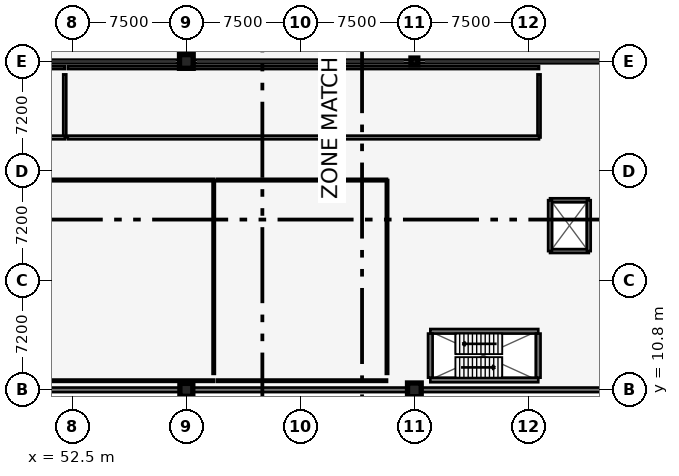
"""IFC4 building model, lengths in metres.
Left out: names, types, materials, properties, quantities, classifications, styles, units other than length and angle.
Written with IfcOpenShell. Run it as: python <this file> out.ifc"""

import sys

from ifc_helpers import new_model, si_unit, direction, frame, frame_2d, origin, origin_2d, place, context, subcontext, project, spatial, rectangle, circle, extrude, element, fill, save


model = new_model("IFC4")
c1 = context("Model", 3, precision=1e-05, world=origin(), true_north=direction((0.0, 1.0)))
c2 = subcontext(c1, "Body", "Model", "MODEL_VIEW")
j1 = project(units=[si_unit("LENGTHUNIT", "METRE"), si_unit("PLANEANGLEUNIT", "RADIAN")], contexts=[c1])
p1 = place(None, origin())
s1 = spatial("IfcSite", under=j1, at=p1, CompositionType="ELEMENT")
p2 = place(p1, origin())
s2 = spatial("IfcBuilding", under=s1, at=p2, CompositionType="ELEMENT")
p3 = place(p2, frame((0.0, 0.0, 4.8)))
s3 = spatial("IfcBuildingStorey", under=s2, at=p3, CompositionType="ELEMENT", Elevation=4.8)
p4 = place(p3, frame((60.0, 10.8, 0.0), z_axis=(0.0, 0.0, 1.0), x_axis=(1.0, 0.0, 0.0)))
e1 = element("IfcColumn", 1, at=p4, inside=s3, PredefinedType="COLUMN", context=c2, shape_type="SweptSolid", body=[
    extrude(rectangle(XDim=0.85, YDim=0.85, at=origin_2d()), origin(), (0.0, 0.0, 1.0), 4.2),
])
p5 = place(p3, frame((60.0, 32.4, 0.0), z_axis=(0.0, 0.0, 1.0), x_axis=(1.0, 0.0, 0.0)))
e2 = element("IfcColumn", 2, at=p5, inside=s3, PredefinedType="COLUMN", context=c2, shape_type="SweptSolid", body=[
    extrude(rectangle(XDim=0.9, YDim=0.9, at=origin_2d()), origin(), (0.0, 0.0, 1.0), 4.2),
])
p6 = place(p3, frame((75.0, 10.8, 0.0), z_axis=(0.0, 0.0, 1.0), x_axis=(1.0, 0.0, 0.0)))
e3 = element("IfcColumn", 3, at=p6, inside=s3, PredefinedType="COLUMN", context=c2, shape_type="SweptSolid", body=[
    extrude(circle(Radius=0.45, at=origin_2d()), origin(), (0.0, 0.0, 1.0), 4.2),
])
p7 = place(p3, frame((75.0, 32.4, 0.0), z_axis=(0.0, 0.0, 1.0), x_axis=(1.0, 0.0, 0.0)))
e4 = element("IfcColumn", 4, at=p7, inside=s3, PredefinedType="COLUMN", context=c2, shape_type="SweptSolid", body=[
    extrude(rectangle(XDim=0.45, YDim=0.45, at=origin_2d()), origin(), (0.0, 0.0, 1.0), 4.2),
])
p8 = place(p3, frame((0.0, 10.8, 0.0), z_axis=(0.0, 0.0, 1.0), x_axis=(1.0, 0.0, 0.0)))
e5 = element("IfcWall", 5, at=p8, inside=s3, PredefinedType="SOLIDWALL", context=c2, shape_type="SweptSolid", body=[
    extrude(rectangle(XDim=93.6, YDim=0.3, at=frame_2d((46.8, 0.0))), origin(), (0.0, 0.0, 1.0), 3.5),
])
p9 = place(p8, frame((2.2, 0.0, 0.72)))
e6 = element("IfcOpeningElement", 6, at=p9, cuts=e5, PredefinedType="OPENING", context=c2, shape_type="SweptSolid", body=[
    extrude(rectangle(XDim=1.2, YDim=2.0, at=frame_2d((0.6, 1.0))), frame((0.0, 0.16, 0.0), z_axis=(0.0, -1.0, 0.0), x_axis=(1.0, 0.0, 0.0)), (0.0, 0.0, 1.0), 0.32),
])
p10 = place(p8, frame((9.4, 0.0, 0.72)))
e7 = element("IfcOpeningElement", 7, at=p10, cuts=e5, PredefinedType="OPENING", context=c2, shape_type="SweptSolid", body=[
    extrude(rectangle(XDim=1.35, YDim=2.05, at=frame_2d((0.675, 1.025))), frame((0.0, 0.16, 0.0), z_axis=(0.0, -1.0, 0.0), x_axis=(1.0, 0.0, 0.0)), (0.0, 0.0, 1.0), 0.32),
])
p11 = place(p8, frame((16.6, 0.0, 0.72)))
e8 = element("IfcOpeningElement", 8, at=p11, cuts=e5, PredefinedType="OPENING", context=c2, shape_type="SweptSolid", body=[
    extrude(rectangle(XDim=1.5, YDim=2.1, at=frame_2d((0.75, 1.05))), frame((0.0, 0.16, 0.0), z_axis=(0.0, -1.0, 0.0), x_axis=(1.0, 0.0, 0.0)), (0.0, 0.0, 1.0), 0.32),
])
p12 = place(p8, frame((23.8, 0.0, 0.72)))
e9 = element("IfcOpeningElement", 9, at=p12, cuts=e5, PredefinedType="OPENING", context=c2, shape_type="SweptSolid", body=[
    extrude(rectangle(XDim=1.65, YDim=2.1, at=frame_2d((0.825, 1.05))), frame((0.0, 0.16, 0.0), z_axis=(0.0, -1.0, 0.0), x_axis=(1.0, 0.0, 0.0)), (0.0, 0.0, 1.0), 0.32),
])
p13 = place(p8, frame((31.0, 0.0, 0.72)))
e10 = element("IfcOpeningElement", 10, at=p13, cuts=e5, PredefinedType="OPENING", context=c2, shape_type="SweptSolid", body=[
    extrude(rectangle(XDim=1.8, YDim=2.15, at=frame_2d((0.9, 1.075))), frame((0.0, 0.16, 0.0), z_axis=(0.0, -1.0, 0.0), x_axis=(1.0, 0.0, 0.0)), (0.0, 0.0, 1.0), 0.32),
])
p14 = place(p8, frame((38.2, 0.0, 0.72)))
e11 = element("IfcOpeningElement", 11, at=p14, cuts=e5, PredefinedType="OPENING", context=c2, shape_type="SweptSolid", body=[
    extrude(rectangle(XDim=1.2, YDim=2.0, at=frame_2d((0.6, 1.0))), frame((0.0, 0.16, 0.0), z_axis=(0.0, -1.0, 0.0), x_axis=(1.0, 0.0, 0.0)), (0.0, 0.0, 1.0), 0.32),
])
p15 = place(p8, frame((52.6, 0.0, 0.72)))
e12 = element("IfcOpeningElement", 12, at=p15, cuts=e5, PredefinedType="OPENING", context=c2, shape_type="SweptSolid", body=[
    extrude(rectangle(XDim=1.5, YDim=2.1, at=frame_2d((0.75, 1.05))), frame((0.0, 0.16, 0.0), z_axis=(0.0, -1.0, 0.0), x_axis=(1.0, 0.0, 0.0)), (0.0, 0.0, 1.0), 0.32),
])
p16 = place(p8, frame((67.0, 0.0, 0.72)))
e13 = element("IfcOpeningElement", 13, at=p16, cuts=e5, PredefinedType="OPENING", context=c2, shape_type="SweptSolid", body=[
    extrude(rectangle(XDim=1.8, YDim=2.15, at=frame_2d((0.9, 1.075))), frame((0.0, 0.16, 0.0), z_axis=(0.0, -1.0, 0.0), x_axis=(1.0, 0.0, 0.0)), (0.0, 0.0, 1.0), 0.32),
])
p17 = place(p8, frame((81.4, 0.0, 0.72)))
e14 = element("IfcOpeningElement", 14, at=p17, cuts=e5, PredefinedType="OPENING", context=c2, shape_type="SweptSolid", body=[
    extrude(rectangle(XDim=1.35, YDim=2.05, at=frame_2d((0.675, 1.025))), frame((0.0, 0.16, 0.0), z_axis=(0.0, -1.0, 0.0), x_axis=(1.0, 0.0, 0.0)), (0.0, 0.0, 1.0), 0.32),
])
p18 = place(p3, frame((45.0, 32.4, 0.0), z_axis=(0.0, 0.0, 1.0), x_axis=(1.0, 0.0, 0.0)))
e15 = element("IfcWall", 15, at=p18, inside=s3, PredefinedType="PARAPET", context=c2, shape_type="SweptSolid", body=[
    extrude(rectangle(XDim=48.6, YDim=0.24, at=frame_2d((24.3, 0.0))), origin(), (0.0, 0.0, 1.0), 1.15),
])
for number, where, z_axis, x_axis in (
    (16, (76.05, 11.45, 0.0), (0.0, 0.0, 1.0), (1.0, 0.0, 0.0)),
    (17, (83.15, 14.65, 0.0), (0.0, 0.0, 1.0), (-1.0, 0.0, 0.0)),
):
    element("IfcWall", number, at=place(p3, frame(where, z_axis=z_axis, x_axis=x_axis)), inside=s3, PredefinedType="SHEAR", context=c2, shape_type="SweptSolid", body=[
        extrude(rectangle(XDim=7.1, YDim=0.3, at=frame_2d((3.55, 0.0))), origin(), (0.0, 0.0, 1.0), 3.9),
    ])
p19 = place(p3, frame((83.15, 11.6, 0.0), z_axis=(0.0, 0.0, 1.0), x_axis=(0.0, 1.0, 0.0)))
e18 = element("IfcWall", 18, at=p19, inside=s3, PredefinedType="SHEAR", context=c2, shape_type="SweptSolid", body=[
    extrude(rectangle(XDim=2.9, YDim=0.3, at=frame_2d((1.45, 0.0))), origin(), (0.0, 0.0, 1.0), 3.9),
])
p20 = place(p3, frame((76.05, 14.5, 0.0), z_axis=(0.0, 0.0, 1.0), x_axis=(0.0, -1.0, 0.0)))
e19 = element("IfcWall", 19, at=p20, inside=s3, PredefinedType="SHEAR", context=c2, shape_type="SweptSolid", body=[
    extrude(rectangle(XDim=2.9, YDim=0.3, at=frame_2d((1.45, 0.0))), origin(), (0.0, 0.0, 1.0), 3.9),
])
p21 = place(p20, frame((0.75, 0.0, 0.0)))
e20 = element("IfcOpeningElement", 20, at=p21, cuts=e19, PredefinedType="OPENING", context=c2, shape_type="SweptSolid", body=[
    extrude(rectangle(XDim=1.07, YDim=2.15, at=frame_2d((0.535, 1.075))), frame((0.0, 0.16, 0.0), z_axis=(0.0, -1.0, 0.0), x_axis=(1.0, 0.0, 0.0)), (0.0, 0.0, 1.0), 0.32),
])
p22 = place(p3, frame((83.925, 19.925, 0.0), z_axis=(0.0, 0.0, 1.0), x_axis=(1.0, 0.0, 0.0)))
e21 = element("IfcWall", 21, at=p22, inside=s3, PredefinedType="SHEAR", context=c2, shape_type="SweptSolid", body=[
    extrude(rectangle(XDim=2.55, YDim=0.25, at=frame_2d((1.275, 0.0))), origin(), (0.0, 0.0, 1.0), 3.9),
])
p23 = place(p3, frame((86.475, 23.275, 0.0), z_axis=(0.0, 0.0, 1.0), x_axis=(-1.0, 0.0, 0.0)))
e22 = element("IfcWall", 22, at=p23, inside=s3, PredefinedType="SHEAR", context=c2, shape_type="SweptSolid", body=[
    extrude(rectangle(XDim=2.55, YDim=0.25, at=frame_2d((1.275, 0.0))), origin(), (0.0, 0.0, 1.0), 3.9),
])
p24 = place(p23, frame((0.525, 0.0, 0.0)))
e23 = element("IfcOpeningElement", 23, at=p24, cuts=e22, PredefinedType="OPENING", context=c2, shape_type="SweptSolid", body=[
    extrude(rectangle(XDim=1.5, YDim=2.2, at=frame_2d((0.75, 1.1))), frame((0.0, 0.135, 0.0), z_axis=(0.0, -1.0, 0.0), x_axis=(1.0, 0.0, 0.0)), (0.0, 0.0, 1.0), 0.27),
])
for number, where, z_axis, x_axis in (
    (24, (83.925, 23.275, 0.0), (0.0, 0.0, 1.0), (0.0, -1.0, 0.0)),
    (25, (86.475, 19.925, 0.0), (0.0, 0.0, 1.0), (0.0, 1.0, 0.0)),
):
    element("IfcWall", number, at=place(p3, frame(where, z_axis=z_axis, x_axis=x_axis)), inside=s3, PredefinedType="SHEAR", context=c2, shape_type="SweptSolid", body=[
        extrude(rectangle(XDim=3.35, YDim=0.25, at=frame_2d((1.675, 0.0))), origin(), (0.0, 0.0, 1.0), 3.9),
    ])
p25 = place(p3, frame((61.8, 11.4, 0.0), z_axis=(0.0, 0.0, 1.0), x_axis=(-1.0, 0.0, 0.0)))
e26 = element("IfcWall", 26, at=p25, inside=s3, PredefinedType="PARTITIONING", context=c2, shape_type="SweptSolid", body=[
    extrude(rectangle(XDim=13.05, YDim=0.15, at=frame_2d((6.525, 0.0))), origin(), (0.0, 0.0, 1.0), 3.082),
])
p26 = place(p3, frame((61.8, 11.85, 0.0), z_axis=(0.0, 0.0, 1.0), x_axis=(0.0, 1.0, 0.0)))
e27 = element("IfcWall", 27, at=p26, inside=s3, PredefinedType="PARTITIONING", context=c2, shape_type="SweptSolid", body=[
    extrude(rectangle(XDim=12.75, YDim=0.15, at=frame_2d((6.375, 0.0))), origin(), (0.0, 0.0, 1.0), 3.6),
])
p27 = place(p3, frame((30.0, 24.6, 0.0), z_axis=(0.0, 0.0, 1.0), x_axis=(1.0, 0.0, 0.0)))
e28 = element("IfcWall", 28, at=p27, inside=s3, PredefinedType="PARTITIONING", context=c2, shape_type="SweptSolid", body=[
    extrude(rectangle(XDim=31.8, YDim=0.16, at=frame_2d((15.9, 0.0))), origin(), (0.0, 0.0, 1.0), 3.082),
])
p28 = place(p27, frame((14.9, 0.0, 0.0)))
e29 = element("IfcOpeningElement", 29, at=p28, cuts=e28, PredefinedType="OPENING", context=c2, shape_type="SweptSolid", body=[
    extrude(rectangle(XDim=2.0, YDim=2.3, at=frame_2d((1.0, 1.15))), frame((0.0, 0.09, 0.0), z_axis=(0.0, -1.0, 0.0), x_axis=(1.0, 0.0, 0.0)), (0.0, 0.0, 1.0), 0.18),
])
p29 = place(p27, frame((26.6, 0.0, 0.0)))
e30 = element("IfcOpeningElement", 30, at=p29, cuts=e28, PredefinedType="OPENING", context=c2, shape_type="SweptSolid", body=[
    extrude(rectangle(XDim=2.0, YDim=2.3, at=frame_2d((1.0, 1.15))), frame((0.0, 0.09, 0.0), z_axis=(0.0, -1.0, 0.0), x_axis=(1.0, 0.0, 0.0)), (0.0, 0.0, 1.0), 0.18),
])
p30 = place(p3, frame((73.2, 11.4, 0.0), z_axis=(0.0, 0.0, 1.0), x_axis=(-1.0, 0.0, 0.0)))
e31 = element("IfcWall", 31, at=p30, inside=s3, PredefinedType="PARTITIONING", context=c2, shape_type="SweptSolid", body=[
    extrude(rectangle(XDim=11.2, YDim=0.15, at=frame_2d((5.6, 0.0))), origin(), (0.0, 0.0, 1.0), 3.6),
])
p31 = place(p3, frame((73.2, 11.85, 0.0), z_axis=(0.0, 0.0, 1.0), x_axis=(0.0, 1.0, 0.0)))
e32 = element("IfcWall", 32, at=p31, inside=s3, PredefinedType="PARTITIONING", context=c2, shape_type="SweptSolid", body=[
    extrude(rectangle(XDim=12.75, YDim=0.15, at=frame_2d((6.375, 0.0))), origin(), (0.0, 0.0, 1.0), 3.6),
])
p32 = place(p3, frame((62.0, 24.6, 0.0), z_axis=(0.0, 0.0, 1.0), x_axis=(1.0, 0.0, 0.0)))
e33 = element("IfcWall", 33, at=p32, inside=s3, PredefinedType="PARTITIONING", context=c2, shape_type="SweptSolid", body=[
    extrude(rectangle(XDim=11.2, YDim=0.16, at=frame_2d((5.6, 0.0))), origin(), (0.0, 0.0, 1.0), 3.6),
])
p33 = place(p32, frame((4.6, 0.0, 0.0)))
e34 = element("IfcOpeningElement", 34, at=p33, cuts=e33, PredefinedType="OPENING", context=c2, shape_type="SweptSolid", body=[
    extrude(rectangle(XDim=2.0, YDim=2.3, at=frame_2d((1.0, 1.15))), frame((0.0, 0.09, 0.0), z_axis=(0.0, -1.0, 0.0), x_axis=(1.0, 0.0, 0.0)), (0.0, 0.0, 1.0), 0.18),
])
p34 = place(p3, frame((13.2, 32.0, 0.0), z_axis=(0.0, 0.0, 1.0), x_axis=(1.0, 0.0, 0.0)))
e35 = element("IfcWall", 35, at=p34, inside=s3, PredefinedType="SOLIDWALL", context=c2, shape_type="SweptSolid", body=[
    extrude(rectangle(XDim=38.8, YDim=0.2, at=frame_2d((19.4, 0.0))), origin(), (0.0, 0.0, 1.0), 3.082),
])
p35 = place(p3, frame((52.0, 27.4, 0.0), z_axis=(0.0, 0.0, 1.0), x_axis=(0.0, 1.0, 0.0)))
e36 = element("IfcWall", 36, at=p35, inside=s3, PredefinedType="SOLIDWALL", context=c2, shape_type="SweptSolid", body=[
    extrude(rectangle(XDim=4.15, YDim=0.2, at=frame_2d((2.075, 0.0))), origin(), (0.0, 0.0, 1.0), 3.6),
])
p36 = place(p3, frame((52.0, 27.4, 0.0), z_axis=(0.0, 0.0, 1.0), x_axis=(-1.0, 0.0, 0.0)))
e37 = element("IfcWall", 37, at=p36, inside=s3, PredefinedType="SOLIDWALL", context=c2, shape_type="SweptSolid", body=[
    extrude(rectangle(XDim=38.8, YDim=0.24, at=frame_2d((19.4, 0.0))), origin(), (0.0, 0.0, 1.0), 3.082),
])
p37 = place(p36, frame((18.6, 0.0, 0.0)))
e38 = element("IfcOpeningElement", 38, at=p37, cuts=e37, PredefinedType="OPENING", context=c2, shape_type="SweptSolid", body=[
    extrude(rectangle(XDim=1.6, YDim=2.15, at=frame_2d((0.8, 1.075))), frame((0.0, 0.13, 0.0), z_axis=(0.0, -1.0, 0.0), x_axis=(1.0, 0.0, 0.0)), (0.0, 0.0, 1.0), 0.26),
])
p38 = place(p36, frame((34.0, 0.0, 0.0)))
e39 = element("IfcOpeningElement", 39, at=p38, cuts=e37, PredefinedType="OPENING", context=c2, shape_type="SweptSolid", body=[
    extrude(rectangle(XDim=1.6, YDim=2.15, at=frame_2d((0.8, 1.075))), frame((0.0, 0.13, 0.0), z_axis=(0.0, -1.0, 0.0), x_axis=(1.0, 0.0, 0.0)), (0.0, 0.0, 1.0), 0.26),
])
p39 = place(p3, frame((52.2, 32.0, 0.0), z_axis=(0.0, 0.0, 1.0), x_axis=(1.0, 0.0, 0.0)))
e40 = element("IfcWall", 40, at=p39, inside=s3, PredefinedType="SOLIDWALL", context=c2, shape_type="SweptSolid", body=[
    extrude(rectangle(XDim=31.0, YDim=0.2, at=frame_2d((15.5, 0.0))), origin(), (0.0, 0.0, 1.0), 3.082),
])
p40 = place(p3, frame((83.2, 27.4, 0.0), z_axis=(0.0, 0.0, 1.0), x_axis=(0.0, 1.0, 0.0)))
e41 = element("IfcWall", 41, at=p40, inside=s3, PredefinedType="SOLIDWALL", context=c2, shape_type="SweptSolid", body=[
    extrude(rectangle(XDim=4.15, YDim=0.2, at=frame_2d((2.075, 0.0))), origin(), (0.0, 0.0, 1.0), 3.6),
])
p41 = place(p3, frame((83.2, 27.4, 0.0), z_axis=(0.0, 0.0, 1.0), x_axis=(-1.0, 0.0, 0.0)))
e42 = element("IfcWall", 42, at=p41, inside=s3, PredefinedType="SOLIDWALL", context=c2, shape_type="SweptSolid", body=[
    extrude(rectangle(XDim=31.0, YDim=0.24, at=frame_2d((15.5, 0.0))), origin(), (0.0, 0.0, 1.0), 3.082),
])
p42 = place(p41, frame((14.7, 0.0, 0.0)))
e43 = element("IfcOpeningElement", 43, at=p42, cuts=e42, PredefinedType="OPENING", context=c2, shape_type="SweptSolid", body=[
    extrude(rectangle(XDim=1.6, YDim=2.15, at=frame_2d((0.8, 1.075))), frame((0.0, 0.13, 0.0), z_axis=(0.0, -1.0, 0.0), x_axis=(1.0, 0.0, 0.0)), (0.0, 0.0, 1.0), 0.26),
])
p43 = place(p41, frame((26.2, 0.0, 0.0)))
e44 = element("IfcOpeningElement", 44, at=p43, cuts=e42, PredefinedType="OPENING", context=c2, shape_type="SweptSolid", body=[
    extrude(rectangle(XDim=1.6, YDim=2.15, at=frame_2d((0.8, 1.075))), frame((0.0, 0.13, 0.0), z_axis=(0.0, -1.0, 0.0), x_axis=(1.0, 0.0, 0.0)), (0.0, 0.0, 1.0), 0.26),
])
p44 = place(p15, origin())
e45 = element("IfcWindow", 45, at=p44, inside=s3, PartitioningType="SINGLE_PANEL", PredefinedType="WINDOW", context=c2, shape_type="SweptSolid", body=[
    extrude(rectangle(XDim=1.5, YDim=2.1, at=frame_2d((0.75, 1.05))), frame((0.0, 0.03, 0.0), z_axis=(0.0, -1.0, 0.0), x_axis=(1.0, 0.0, 0.0)), (0.0, 0.0, 1.0), 0.06),
])
fill(e12, e45)
p45 = place(p16, origin())
e46 = element("IfcWindow", 46, at=p45, inside=s3, PartitioningType="SINGLE_PANEL", PredefinedType="WINDOW", context=c2, shape_type="SweptSolid", body=[
    extrude(rectangle(XDim=1.8, YDim=2.15, at=frame_2d((0.9, 1.075))), frame((0.0, 0.03, 0.0), z_axis=(0.0, -1.0, 0.0), x_axis=(1.0, 0.0, 0.0)), (0.0, 0.0, 1.0), 0.06),
])
fill(e13, e46)
p46 = place(p17, origin())
e47 = element("IfcWindow", 47, at=p46, inside=s3, PartitioningType="SINGLE_PANEL", PredefinedType="WINDOW", context=c2, shape_type="SweptSolid", body=[
    extrude(rectangle(XDim=1.35, YDim=2.05, at=frame_2d((0.675, 1.025))), frame((0.0, 0.03, 0.0), z_axis=(0.0, -1.0, 0.0), x_axis=(1.0, 0.0, 0.0)), (0.0, 0.0, 1.0), 0.06),
])
fill(e14, e47)
p47 = place(p21, origin())
e48 = element("IfcDoor", 48, at=p47, inside=s3, OperationType="SINGLE_SWING_RIGHT", PredefinedType="DOOR", context=c2, shape_type="SweptSolid", body=[
    extrude(rectangle(XDim=1.07, YDim=2.15, at=frame_2d((0.535, 1.075))), frame((0.0, 0.025, 0.0), z_axis=(0.0, -1.0, 0.0), x_axis=(1.0, 0.0, 0.0)), (0.0, 0.0, 1.0), 0.05),
])
fill(e20, e48)
p48 = place(p24, origin())
e49 = element("IfcDoor", 49, at=p48, inside=s3, OperationType="SLIDING_TO_RIGHT", PredefinedType="DOOR", context=c2, shape_type="SweptSolid", body=[
    extrude(rectangle(XDim=1.5, YDim=2.2, at=frame_2d((0.75, 1.1))), frame((0.0, 0.025, 0.0), z_axis=(0.0, -1.0, 0.0), x_axis=(1.0, 0.0, 0.0)), (0.0, 0.0, 1.0), 0.05),
])
fill(e23, e49)
p49 = place(p29, origin())
e50 = element("IfcDoor", 50, at=p49, inside=s3, OperationType="DOUBLE_SWING_LEFT", PredefinedType="DOOR", context=c2, shape_type="SweptSolid", body=[
    extrude(rectangle(XDim=2.0, YDim=2.3, at=frame_2d((1.0, 1.15))), frame((0.0, 0.025, 0.0), z_axis=(0.0, -1.0, 0.0), x_axis=(1.0, 0.0, 0.0)), (0.0, 0.0, 1.0), 0.05),
])
fill(e30, e50)
p50 = place(p33, origin())
e51 = element("IfcDoor", 51, at=p50, inside=s3, OperationType="DOUBLE_SWING_LEFT", PredefinedType="DOOR", context=c2, shape_type="SweptSolid", body=[
    extrude(rectangle(XDim=2.0, YDim=2.3, at=frame_2d((1.0, 1.15))), frame((0.0, 0.025, 0.0), z_axis=(0.0, -1.0, 0.0), x_axis=(1.0, 0.0, 0.0)), (0.0, 0.0, 1.0), 0.05),
])
fill(e34, e51)
p51 = place(p42, origin())
e52 = element("IfcDoor", 52, at=p51, inside=s3, OperationType="DOUBLE_SWING_RIGHT", PredefinedType="DOOR", context=c2, shape_type="SweptSolid", body=[
    extrude(rectangle(XDim=1.6, YDim=2.15, at=frame_2d((0.8, 1.075))), frame((0.0, 0.025, 0.0), z_axis=(0.0, -1.0, 0.0), x_axis=(1.0, 0.0, 0.0)), (0.0, 0.0, 1.0), 0.05),
])
fill(e43, e52)
p52 = place(p43, origin())
e53 = element("IfcDoor", 53, at=p52, inside=s3, OperationType="DOUBLE_SWING_RIGHT", PredefinedType="DOOR", context=c2, shape_type="SweptSolid", body=[
    extrude(rectangle(XDim=1.6, YDim=2.15, at=frame_2d((0.8, 1.075))), frame((0.0, 0.025, 0.0), z_axis=(0.0, -1.0, 0.0), x_axis=(1.0, 0.0, 0.0)), (0.0, 0.0, 1.0), 0.05),
])
fill(e44, e53)
save(model, sys.argv[1])
